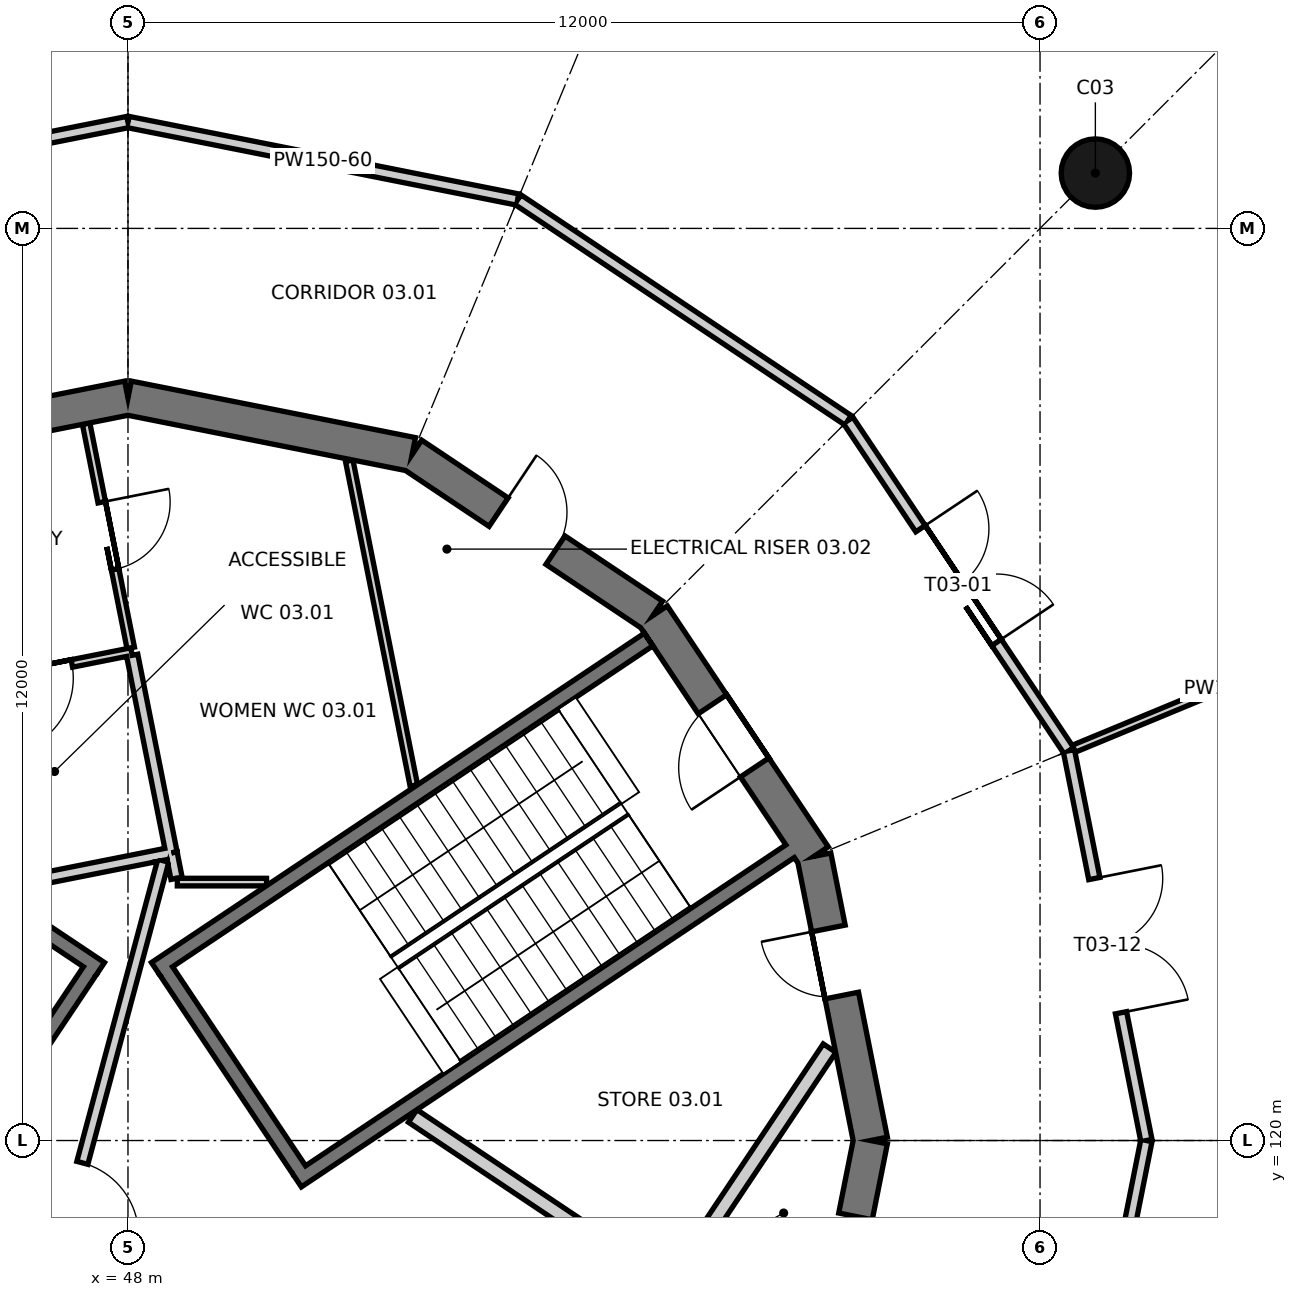
"""IFC4 building model, lengths in metres.
Left out: names, types, materials, properties, quantities, classifications, styles, units other than length and angle.
Written with IfcOpenShell. Run it as: python <this file> out.ifc"""

import sys

from ifc_helpers import new_model, si_unit, direction, frame, frame_2d, origin, origin_2d, place, context, subcontext, project, spatial, polyline, rectangle, circle, outline, extrude, element, fill, save


model = new_model("IFC4")
c1 = context("Model", 3, precision=1e-05, world=origin(), true_north=direction((0.0, 1.0)))
c2 = subcontext(c1, "Body", "Model", "MODEL_VIEW")
j1 = project(units=[si_unit("LENGTHUNIT", "METRE"), si_unit("PLANEANGLEUNIT", "RADIAN")], contexts=[c1])
p1 = place(None, origin())
s1 = spatial("IfcSite", under=j1, at=p1, CompositionType="ELEMENT")
p2 = place(p1, origin())
s2 = spatial("IfcBuilding", under=s1, at=p2, CompositionType="ELEMENT")
p3 = place(p2, frame((0.0, 0.0, 15.6)))
s3 = spatial("IfcBuildingStorey", under=s2, at=p3, CompositionType="ELEMENT", Elevation=15.6)
p4 = place(p3, frame((57.771, 120.0, 0.0), z_axis=(0.0, 0.0, 1.0), x_axis=(-0.195069197673, 0.98078948206, 0.0)))
e1 = element("IfcWall", 1, at=p4, inside=s3, PredefinedType="SHEAR", context=c2, shape_type="SweptSolid", body=[
    extrude(outline(polyline([(-0.045, -0.225), (3.857, -0.225), (3.768, 0.225), (0.045, 0.225), (-0.045, -0.225)])), origin(), (0.0, 0.0, 1.0), 4.8),
])
p5 = place(p4, frame((1.945, 0.0, 0.0)))
e2 = element("IfcOpeningElement", 2, at=p5, cuts=e1, PredefinedType="OPENING", context=c2, shape_type="SweptSolid", body=[
    extrude(rectangle(XDim=0.9, YDim=2.1, at=frame_2d((0.45, 1.05))), frame((0.0, 0.235, 0.0), z_axis=(0.0, -1.0, 0.0), x_axis=(1.0, 0.0, 0.0)), (0.0, 0.0, 1.0), 0.47),
])
p6 = place(p3, frame((57.027, 123.739, 0.0), z_axis=(0.0, 0.0, 1.0), x_axis=(-0.555542277102, 0.83148829117, 0.0)))
e3 = element("IfcWall", 3, at=p6, inside=s3, PredefinedType="SHEAR", context=c2, shape_type="SweptSolid", body=[
    extrude(outline(polyline([(-0.045, -0.225), (3.857, -0.225), (3.768, 0.225), (0.045, 0.225), (-0.045, -0.225)])), origin(), (0.0, 0.0, 1.0), 4.8),
])
p7 = place(p6, frame((1.406, 0.0, 0.0)))
e4 = element("IfcOpeningElement", 4, at=p7, cuts=e3, PredefinedType="OPENING", context=c2, shape_type="SweptSolid", body=[
    extrude(rectangle(XDim=1.0, YDim=2.1, at=frame_2d((0.5, 1.05))), frame((0.0, 0.235, 0.0), z_axis=(0.0, -1.0, 0.0), x_axis=(1.0, 0.0, 0.0)), (0.0, 0.0, 1.0), 0.47),
])
p8 = place(p3, frame((54.909, 126.909, 0.0), z_axis=(0.0, 0.0, 1.0), x_axis=(-0.83148829117, 0.555542277102, 0.0)))
e5 = element("IfcWall", 5, at=p8, inside=s3, PredefinedType="SHEAR", context=c2, shape_type="SweptSolid", body=[
    extrude(outline(polyline([(-0.045, -0.225), (3.857, -0.225), (3.768, 0.225), (0.045, 0.225), (-0.045, -0.225)])), origin(), (0.0, 0.0, 1.0), 4.8),
])
p9 = place(p8, frame((1.545, 0.0, 0.0)))
e6 = element("IfcOpeningElement", 6, at=p9, cuts=e5, PredefinedType="OPENING", context=c2, shape_type="SweptSolid", body=[
    extrude(rectangle(XDim=0.9, YDim=2.1, at=frame_2d((0.45, 1.05))), frame((0.0, 0.235, 0.0), z_axis=(0.0, -1.0, 0.0), x_axis=(1.0, 0.0, 0.0)), (0.0, 0.0, 1.0), 0.47),
])
p10 = place(p3, frame((51.739, 129.027, 0.0), z_axis=(0.0, 0.0, 1.0), x_axis=(-0.98078948206, 0.195069197673, 0.0)))
e7 = element("IfcWall", 7, at=p10, inside=s3, PredefinedType="SHEAR", context=c2, shape_type="SweptSolid", body=[
    extrude(outline(polyline([(-0.045, -0.225), (3.857, -0.225), (3.768, 0.225), (0.045, 0.225), (-0.045, -0.225)])), origin(), (0.0, 0.0, 1.0), 4.8),
])
p11 = place(p3, frame((48.0, 129.771, 0.0), z_axis=(0.0, 0.0, 1.0), x_axis=(-0.98078948206, -0.195069197673, 0.0)))
e8 = element("IfcWall", 8, at=p11, inside=s3, PredefinedType="SHEAR", context=c2, shape_type="SweptSolid", body=[
    extrude(outline(polyline([(-0.045, -0.225), (3.857, -0.225), (3.768, 0.225), (0.045, 0.225), (-0.045, -0.225)])), origin(), (0.0, 0.0, 1.0), 4.8),
])
p12 = place(p11, frame((1.395, 0.0, 0.0)))
e9 = element("IfcOpeningElement", 9, at=p12, cuts=e8, PredefinedType="OPENING", context=c2, shape_type="SweptSolid", body=[
    extrude(rectangle(XDim=1.0, YDim=2.1, at=frame_2d((0.5, 1.05))), frame((0.0, 0.235, 0.0), z_axis=(0.0, -1.0, 0.0), x_axis=(1.0, 0.0, 0.0)), (0.0, 0.0, 1.0), 0.47),
])
p13 = place(p3, frame((57.027, 116.261, 0.0), z_axis=(0.0, 0.0, 1.0), x_axis=(0.195069197673, 0.98078948206, 0.0)))
e10 = element("IfcWall", 10, at=p13, inside=s3, PredefinedType="SHEAR", context=c2, shape_type="SweptSolid", body=[
    extrude(outline(polyline([(-0.045, -0.225), (3.857, -0.225), (3.768, 0.225), (0.045, 0.225), (-0.045, -0.225)])), origin(), (0.0, 0.0, 1.0), 4.8),
])
p14 = place(p13, frame((1.895, 0.0, 0.0)))
e11 = element("IfcOpeningElement", 11, at=p14, cuts=e10, PredefinedType="OPENING", context=c2, shape_type="SweptSolid", body=[
    extrude(rectangle(XDim=0.9, YDim=2.1, at=frame_2d((0.45, 1.05))), frame((0.0, 0.235, 0.0), z_axis=(0.0, -1.0, 0.0), x_axis=(1.0, 0.0, 0.0)), (0.0, 0.0, 1.0), 0.47),
])
p15 = place(p3, frame((48.365, 122.258, 0.0), z_axis=(0.0, 0.0, 1.0), x_axis=(0.831476803301, 0.555559470779, 0.0)))
e12 = element("IfcWall", 12, at=p15, inside=s3, PredefinedType="SHEAR", context=c2, shape_type="SweptSolid", body=[
    extrude(rectangle(XDim=7.8, YDim=0.2, at=frame_2d((3.9, 0.0))), origin(), (0.0, 0.0, 1.0), 4.8),
])
p16 = place(p3, frame((50.226, 119.473, 0.0), z_axis=(0.0, 0.0, 1.0), x_axis=(0.831486463828, 0.555545012102, 0.0)))
e13 = element("IfcWall", 13, at=p16, inside=s3, PredefinedType="SHEAR", context=c2, shape_type="SweptSolid", body=[
    extrude(rectangle(XDim=7.8, YDim=0.2, at=frame_2d((3.9, 0.0))), origin(), (0.0, 0.0, 1.0), 4.8),
])
p17 = place(p3, frame((50.253, 119.612, 0.0), z_axis=(0.0, 0.0, 1.0), x_axis=(-0.55555842186, 0.831477504146, 0.0)))
e14 = element("IfcWall", 14, at=p17, inside=s3, PredefinedType="SHEAR", context=c2, shape_type="SweptSolid", body=[
    extrude(rectangle(XDim=3.15, YDim=0.2, at=frame_2d((1.575, 0.0))), origin(), (0.0, 0.0, 1.0), 4.8),
])
p18 = place(p3, frame((47.635, 122.258, 0.0), z_axis=(0.0, 0.0, 1.0), x_axis=(-0.831476803301, 0.555559470779, 0.0)))
e15 = element("IfcWall", 15, at=p18, inside=s3, PredefinedType="SHEAR", context=c2, shape_type="SweptSolid", body=[
    extrude(rectangle(XDim=7.8, YDim=0.2, at=frame_2d((3.9, 0.0))), origin(), (0.0, 0.0, 1.0), 4.8),
])
p19 = place(p3, frame((47.497, 122.231, 0.0), z_axis=(0.0, 0.0, 1.0), x_axis=(-0.55555842186, -0.831477504146, 0.0)))
e16 = element("IfcWall", 16, at=p19, inside=s3, PredefinedType="SHEAR", context=c2, shape_type="SweptSolid", body=[
    extrude(rectangle(XDim=3.15, YDim=0.2, at=frame_2d((1.575, 0.0))), origin(), (0.0, 0.0, 1.0), 4.8),
])
p20 = place(p3, frame((60.728, 132.728, 0.0), z_axis=(0.0, 0.0, 1.0), x_axis=(1.0, 0.0, 0.0)))
e17 = element("IfcColumn", 17, at=p20, inside=s3, PredefinedType="COLUMN", context=c2, shape_type="SweptSolid", body=[
    extrude(circle(Radius=0.45, at=origin_2d()), origin(), (0.0, 0.0, 1.0), 4.8),
])
p21 = place(p3, frame((55.126, 118.065, 0.0), z_axis=(0.0, 0.0, 1.0), x_axis=(-0.831495502265, 0.555531483998, 0.0)))
e18 = element("IfcWall", 18, at=p21, inside=s3, PredefinedType="SOLIDWALL", context=c2, shape_type="SweptSolid", body=[
    extrude(rectangle(XDim=4.065, YDim=0.2, at=frame_2d((2.033, 0.0))), origin(), (0.0, 0.0, 1.0), 4.52),
])
p22 = place(p3, frame((57.231, 121.215, 0.0), z_axis=(0.0, 0.0, 1.0), x_axis=(-0.555600969312, -0.831449074147, 0.0)))
e19 = element("IfcWall", 19, at=p22, inside=s3, PredefinedType="SOLIDWALL", context=c2, shape_type="SweptSolid", body=[
    extrude(rectangle(XDim=3.689, YDim=0.2, at=frame_2d((1.844, 0.0))), origin(), (0.0, 0.0, 1.0), 4.52),
])
p23 = place(p3, frame((48.046, 126.433, 0.0), z_axis=(0.0, 0.0, 1.0), x_axis=(-0.980778805994, -0.195122868248, 0.0)))
e20 = element("IfcWall", 20, at=p23, inside=s3, PredefinedType="PARTITIONING", context=c2, shape_type="SweptSolid", body=[
    extrude(rectangle(XDim=2.6, YDim=0.1, at=frame_2d((1.3, 0.0))), origin(), (0.0, 0.0, 1.0), 4.52),
])
p24 = place(p23, frame((0.8, 0.0, 0.0)))
e21 = element("IfcOpeningElement", 21, at=p24, cuts=e20, PredefinedType="OPENING", context=c2, shape_type="SweptSolid", body=[
    extrude(rectangle(XDim=1.0, YDim=2.1, at=frame_2d((0.5, 1.05))), frame((0.0, 0.06, 0.0), z_axis=(0.0, -1.0, 0.0), x_axis=(1.0, 0.0, 0.0)), (0.0, 0.0, 1.0), 0.12),
])
p25 = place(p3, frame((47.449, 129.432, 0.0), z_axis=(0.0, 0.0, 1.0), x_axis=(0.195054549846, -0.980792395252, 0.0)))
e22 = element("IfcWall", 22, at=p25, inside=s3, PredefinedType="PARTITIONING", context=c2, shape_type="SweptSolid", body=[
    extrude(rectangle(XDim=3.008, YDim=0.1, at=frame_2d((1.504, 0.0))), origin(), (0.0, 0.0, 1.0), 4.52),
])
p26 = place(p25, frame((1.054, 0.0, 0.0)))
e23 = element("IfcOpeningElement", 23, at=p26, cuts=e22, PredefinedType="OPENING", context=c2, shape_type="SweptSolid", body=[
    extrude(rectangle(XDim=0.9, YDim=2.1, at=frame_2d((0.45, 1.05))), frame((0.0, 0.06, 0.0), z_axis=(0.0, -1.0, 0.0), x_axis=(1.0, 0.0, 0.0)), (0.0, 0.0, 1.0), 0.12),
])
p27 = place(p3, frame((48.056, 126.384, 0.0), z_axis=(0.0, 0.0, 1.0), x_axis=(0.195123903338, -0.980778600065, 0.0)))
e24 = element("IfcWall", 24, at=p27, inside=s3, PredefinedType="PARTITIONING", context=c2, shape_type="SweptSolid", body=[
    extrude(rectangle(XDim=2.65, YDim=0.15, at=frame_2d((1.325, 0.0))), origin(), (0.0, 0.0, 1.0), 4.52),
])
p28 = place(p3, frame((48.524, 123.775, 0.0), z_axis=(0.0, 0.0, 1.0), x_axis=(-0.980777249161, -0.195130693455, 0.0)))
e25 = element("IfcWall", 25, at=p28, inside=s3, PredefinedType="PARTITIONING", context=c2, shape_type="SweptSolid", body=[
    extrude(rectangle(XDim=2.287, YDim=0.15, at=frame_2d((1.144, 0.0))), origin(), (0.0, 0.0, 1.0), 4.52),
])
p29 = place(p3, frame((50.911, 128.943, 0.0), z_axis=(0.0, 0.0, 1.0), x_axis=(0.195113868301, -0.980780596462, 0.0)))
e26 = element("IfcWall", 26, at=p29, inside=s3, PredefinedType="PARTITIONING", context=c2, shape_type="SweptSolid", body=[
    extrude(rectangle(XDim=4.357, YDim=0.1, at=frame_2d((2.178, 0.0))), origin(), (0.0, 0.0, 1.0), 4.52),
])
p30 = place(p3, frame((49.823, 123.4, 0.0), z_axis=(0.0, 0.0, 1.0), x_axis=(-1.0, 0.0, 0.0)))
e27 = element("IfcWall", 27, at=p30, inside=s3, PredefinedType="PARTITIONING", context=c2, shape_type="SweptSolid", body=[
    extrude(rectangle(XDim=1.174, YDim=0.1, at=frame_2d((0.587, 0.0))), origin(), (0.0, 0.0, 1.0), 4.52),
])
p31 = place(p3, frame((48.639, 123.449, 0.0), z_axis=(0.0, 0.0, 1.0), x_axis=(-0.194880473507, 0.98082699853, 0.0)))
e28 = element("IfcWall", 28, at=p31, inside=s3, PredefinedType="PARTITIONING", context=c2, shape_type="SweptSolid", body=[
    extrude(rectangle(XDim=0.342, YDim=0.15, at=frame_2d((0.171, 0.0))), origin(), (0.0, 0.0, 1.0), 4.52),
])
p32 = place(p3, frame((47.102, 118.595, 0.0), z_axis=(0.0, 0.0, 1.0), x_axis=(0.258814124304, 0.9659271448, 0.0)))
e29 = element("IfcWall", 29, at=p32, inside=s3, PredefinedType="PARTITIONING", context=c2, shape_type="SweptSolid", body=[
    extrude(rectangle(XDim=5.265, YDim=0.15, at=frame_2d((2.632, 0.0))), origin(), (0.0, 0.0, 1.0), 4.52),
])
p33 = place(p32, frame((0.15, 0.0, 0.0)))
e30 = element("IfcOpeningElement", 30, at=p33, cuts=e29, PredefinedType="OPENING", context=c2, shape_type="SweptSolid", body=[
    extrude(rectangle(XDim=1.0, YDim=2.1, at=frame_2d((0.5, 1.05))), frame((0.0, 0.085, 0.0), z_axis=(0.0, -1.0, 0.0), x_axis=(1.0, 0.0, 0.0)), (0.0, 0.0, 1.0), 0.17),
])
p34 = place(p3, frame((48.0, 133.4, 0.0), z_axis=(0.0, 0.0, 1.0), x_axis=(0.980784881595, -0.195092326952, 0.0)))
e31 = element("IfcWall", 31, at=p34, inside=s3, PredefinedType="PARTITIONING", context=c2, shape_type="SweptSolid", body=[
    extrude(rectangle(XDim=5.229, YDim=0.15, at=frame_2d((2.614, 0.0))), origin(), (0.0, 0.0, 1.0), 4.52),
])
p35 = place(p3, frame((53.128, 132.38, 0.0), z_axis=(0.0, 0.0, 1.0), x_axis=(0.831460742974, -0.555583506678, 0.0)))
e32 = element("IfcWall", 32, at=p35, inside=s3, PredefinedType="PARTITIONING", context=c2, shape_type="SweptSolid", body=[
    extrude(rectangle(XDim=5.228, YDim=0.15, at=frame_2d((2.614, 0.0))), origin(), (0.0, 0.0, 1.0), 4.52),
])
p36 = place(p3, frame((57.475, 129.475, 0.0), z_axis=(0.0, 0.0, 1.0), x_axis=(0.555583506678, -0.831460742974, 0.0)))
e33 = element("IfcWall", 33, at=p36, inside=s3, PredefinedType="PARTITIONING", context=c2, shape_type="SweptSolid", body=[
    extrude(rectangle(XDim=5.228, YDim=0.15, at=frame_2d((2.614, 0.0))), origin(), (0.0, 0.0, 1.0), 4.52),
])
p37 = place(p36, frame((1.714, 0.0, 0.0)))
e34 = element("IfcOpeningElement", 34, at=p37, cuts=e33, PredefinedType="OPENING", context=c2, shape_type="SweptSolid", body=[
    extrude(rectangle(XDim=1.8, YDim=2.1, at=frame_2d((0.9, 1.05))), frame((0.0, 0.085, 0.0), z_axis=(0.0, -1.0, 0.0), x_axis=(1.0, 0.0, 0.0)), (0.0, 0.0, 1.0), 0.17),
])
p38 = place(p3, frame((60.38, 125.128, 0.0), z_axis=(0.0, 0.0, 1.0), x_axis=(0.195092326952, -0.980784881595, 0.0)))
e35 = element("IfcWall", 35, at=p38, inside=s3, PredefinedType="PARTITIONING", context=c2, shape_type="SweptSolid", body=[
    extrude(rectangle(XDim=5.229, YDim=0.15, at=frame_2d((2.614, 0.0))), origin(), (0.0, 0.0, 1.0), 4.52),
])
p39 = place(p38, frame((1.714, 0.0, 0.0)))
e36 = element("IfcOpeningElement", 36, at=p39, cuts=e35, PredefinedType="OPENING", context=c2, shape_type="SweptSolid", body=[
    extrude(rectangle(XDim=1.8, YDim=2.1, at=frame_2d((0.9, 1.05))), frame((0.0, 0.085, 0.0), z_axis=(0.0, -1.0, 0.0), x_axis=(1.0, 0.0, 0.0)), (0.0, 0.0, 1.0), 0.17),
])
p40 = place(p3, frame((42.872, 132.38, 0.0), z_axis=(0.0, 0.0, 1.0), x_axis=(0.980784881595, 0.195092326952, 0.0)))
e37 = element("IfcWall", 37, at=p40, inside=s3, PredefinedType="PARTITIONING", context=c2, shape_type="SweptSolid", body=[
    extrude(rectangle(XDim=5.229, YDim=0.15, at=frame_2d((2.614, 0.0))), origin(), (0.0, 0.0, 1.0), 4.52),
])
p41 = place(p40, frame((1.714, 0.0, 0.0)))
e38 = element("IfcOpeningElement", 38, at=p41, cuts=e37, PredefinedType="OPENING", context=c2, shape_type="SweptSolid", body=[
    extrude(rectangle(XDim=1.8, YDim=2.1, at=frame_2d((0.9, 1.05))), frame((0.0, 0.085, 0.0), z_axis=(0.0, -1.0, 0.0), x_axis=(1.0, 0.0, 0.0)), (0.0, 0.0, 1.0), 0.17),
])
p42 = place(p3, frame((61.4, 120.0, 0.0), z_axis=(0.0, 0.0, 1.0), x_axis=(-0.195092326952, -0.980784881595, 0.0)))
e39 = element("IfcWall", 39, at=p42, inside=s3, PredefinedType="PARTITIONING", context=c2, shape_type="SweptSolid", body=[
    extrude(rectangle(XDim=5.229, YDim=0.15, at=frame_2d((2.614, 0.0))), origin(), (0.0, 0.0, 1.0), 4.52),
])
p43 = place(p42, frame((1.714, 0.0, 0.0)))
e40 = element("IfcOpeningElement", 40, at=p43, cuts=e39, PredefinedType="OPENING", context=c2, shape_type="SweptSolid", body=[
    extrude(rectangle(XDim=1.8, YDim=2.1, at=frame_2d((0.9, 1.05))), frame((0.0, 0.085, 0.0), z_axis=(0.0, -1.0, 0.0), x_axis=(1.0, 0.0, 0.0)), (0.0, 0.0, 1.0), 0.17),
])
p44 = place(p3, frame((64.223, 126.72, 0.0), z_axis=(0.0, 0.0, 1.0), x_axis=(-0.92387345726, -0.38269809899, 0.0)))
e41 = element("IfcWall", 41, at=p44, inside=s3, PredefinedType="PARTITIONING", context=c2, shape_type="SweptSolid", body=[
    extrude(rectangle(XDim=4.089, YDim=0.1, at=frame_2d((2.044, 0.0))), origin(), (0.0, 0.0, 1.0), 3.72),
])
p45 = place(p7, origin())
e42 = element("IfcDoor", 42, at=p45, inside=s3, OperationType="SINGLE_SWING_LEFT", PredefinedType="DOOR", context=c2, shape_type="SweptSolid", body=[
    extrude(rectangle(XDim=1.0, YDim=2.1, at=frame_2d((0.5, 1.05))), frame((0.0, 0.025, 0.0), z_axis=(0.0, -1.0, 0.0), x_axis=(1.0, 0.0, 0.0)), (0.0, 0.0, 1.0), 0.05),
])
fill(e4, e42)
p46 = place(p5, origin())
e43 = element("IfcDoor", 43, at=p46, inside=s3, OperationType="SINGLE_SWING_RIGHT", PredefinedType="DOOR", context=c2, shape_type="SweptSolid", body=[
    extrude(rectangle(XDim=0.9, YDim=2.1, at=frame_2d((0.45, 1.05))), frame((0.0, 0.025, 0.0), z_axis=(0.0, -1.0, 0.0), x_axis=(1.0, 0.0, 0.0)), (0.0, 0.0, 1.0), 0.05),
])
fill(e2, e43)
p47 = place(p14, frame((0.9, 0.0, 0.0), z_axis=(0.0, 0.0, 1.0), x_axis=(-1.0, 0.0, 0.0)))
e44 = element("IfcDoor", 44, at=p47, inside=s3, OperationType="SINGLE_SWING_RIGHT", PredefinedType="DOOR", context=c2, shape_type="SweptSolid", body=[
    extrude(rectangle(XDim=0.9, YDim=2.1, at=frame_2d((0.45, 1.05))), frame((0.0, 0.025, 0.0), z_axis=(0.0, -1.0, 0.0), x_axis=(1.0, 0.0, 0.0)), (0.0, 0.0, 1.0), 0.05),
])
fill(e11, e44)
p48 = place(p9, frame((0.9, 0.0, 0.0), z_axis=(0.0, 0.0, 1.0), x_axis=(-1.0, 0.0, 0.0)))
e45 = element("IfcDoor", 45, at=p48, inside=s3, OperationType="SINGLE_SWING_LEFT", PredefinedType="DOOR", context=c2, shape_type="SweptSolid", body=[
    extrude(rectangle(XDim=0.9, YDim=2.1, at=frame_2d((0.45, 1.05))), frame((0.0, 0.025, 0.0), z_axis=(0.0, -1.0, 0.0), x_axis=(1.0, 0.0, 0.0)), (0.0, 0.0, 1.0), 0.05),
])
fill(e6, e45)
p49 = place(p24, origin())
e46 = element("IfcDoor", 46, at=p49, inside=s3, OperationType="SINGLE_SWING_RIGHT", PredefinedType="DOOR", context=c2, shape_type="SweptSolid", body=[
    extrude(rectangle(XDim=1.0, YDim=2.1, at=frame_2d((0.5, 1.05))), frame((0.0, 0.025, 0.0), z_axis=(0.0, -1.0, 0.0), x_axis=(1.0, 0.0, 0.0)), (0.0, 0.0, 1.0), 0.05),
])
fill(e21, e46)
p50 = place(p26, origin())
e47 = element("IfcDoor", 47, at=p50, inside=s3, OperationType="SINGLE_SWING_LEFT", PredefinedType="DOOR", context=c2, shape_type="SweptSolid", body=[
    extrude(rectangle(XDim=0.9, YDim=2.1, at=frame_2d((0.45, 1.05))), frame((0.0, 0.025, 0.0), z_axis=(0.0, -1.0, 0.0), x_axis=(1.0, 0.0, 0.0)), (0.0, 0.0, 1.0), 0.05),
])
fill(e23, e47)
p51 = place(p33, frame((1.0, 0.0, 0.0), z_axis=(0.0, 0.0, 1.0), x_axis=(-1.0, 0.0, 0.0)))
e48 = element("IfcDoor", 48, at=p51, inside=s3, OperationType="SINGLE_SWING_RIGHT", PredefinedType="DOOR", context=c2, shape_type="SweptSolid", body=[
    extrude(rectangle(XDim=1.0, YDim=2.1, at=frame_2d((0.5, 1.05))), frame((0.0, 0.025, 0.0), z_axis=(0.0, -1.0, 0.0), x_axis=(1.0, 0.0, 0.0)), (0.0, 0.0, 1.0), 0.05),
])
fill(e30, e48)
p52 = place(p37, origin())
e49 = element("IfcDoor", 49, at=p52, inside=s3, OperationType="DOUBLE_DOOR_SINGLE_SWING", PredefinedType="DOOR", context=c2, shape_type="SweptSolid", body=[
    extrude(rectangle(XDim=1.8, YDim=2.1, at=frame_2d((0.9, 1.05))), frame((0.0, 0.025, 0.0), z_axis=(0.0, -1.0, 0.0), x_axis=(1.0, 0.0, 0.0)), (0.0, 0.0, 1.0), 0.05),
])
fill(e34, e49)
p53 = place(p39, origin())
e50 = element("IfcDoor", 50, at=p53, inside=s3, OperationType="DOUBLE_DOOR_SINGLE_SWING", PredefinedType="DOOR", context=c2, shape_type="SweptSolid", body=[
    extrude(rectangle(XDim=1.8, YDim=2.1, at=frame_2d((0.9, 1.05))), frame((0.0, 0.025, 0.0), z_axis=(0.0, -1.0, 0.0), x_axis=(1.0, 0.0, 0.0)), (0.0, 0.0, 1.0), 0.05),
])
fill(e36, e50)
save(model, sys.argv[1])
